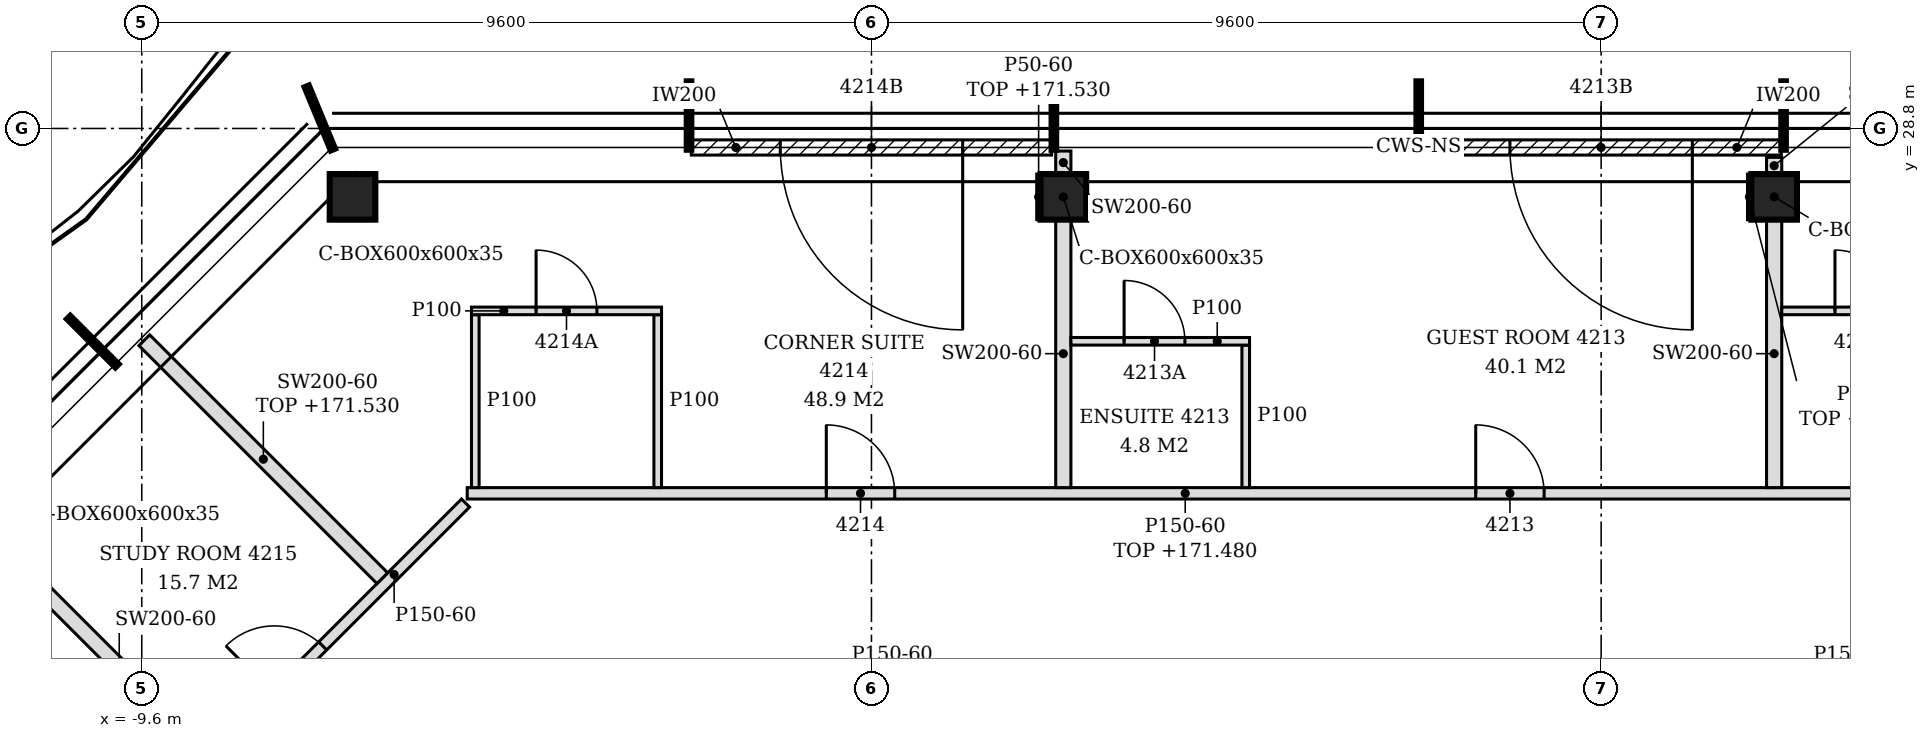
"""IFC4 building model, lengths in metres.
Left out: names, types, materials, properties, quantities, classifications, styles, units other than length and angle.
Written with IfcOpenShell. Run it as: python <this file> out.ifc"""

import sys

from ifc_helpers import new_model, si_unit, direction, frame, frame_2d, origin, origin_2d, place, context, subcontext, project, spatial, polyline, rectangle, hollow_rectangle, outline, extrude, clip, halfspace, element, fill, save


model = new_model("IFC4")
c1 = context("Model", 3, precision=1e-05, world=origin(), true_north=direction((0.0, 1.0)))
c2 = subcontext(c1, "Body", "Model", "MODEL_VIEW")
j1 = project(units=[si_unit("LENGTHUNIT", "METRE"), si_unit("PLANEANGLEUNIT", "RADIAN")], contexts=[c1])
p1 = place(None, origin())
s1 = spatial("IfcSite", under=j1, at=p1, CompositionType="ELEMENT")
p2 = place(p1, origin())
s2 = spatial("IfcBuilding", under=s1, at=p2, CompositionType="ELEMENT")
p3 = place(p2, frame((0.0, 0.0, 168.6)))
s3 = spatial("IfcBuildingStorey", under=s2, at=p3, CompositionType="ELEMENT", Elevation=168.6)
for number, where, z_axis, x_axis in (
    (1, (11.876, 27.9, -0.15), (0.0, 0.0, 1.0), (1.0, 0.0, 0.0)),
    (2, (2.524, 27.9, -0.15), (0.0, 0.0, 1.0), (1.0, 0.0, 0.0)),
    (3, (-6.827, 27.9, -0.15), (0.0, 0.0, 1.0), (1.0, 0.0, 0.0)),
):
    element("IfcColumn", number, at=place(p3, frame(where, z_axis=z_axis, x_axis=x_axis)), inside=s3, PredefinedType="COLUMN", context=c2, shape_type="Clipping", body=[
        clip(extrude(hollow_rectangle(XDim=0.6, YDim=0.6, WallThickness=0.035, at=origin_2d()), origin(), (0.0, 0.0, 1.0), 3.6), halfspace(frame((0.0, 0.0, 3.589), z_axis=(0.0, 0.0, 1.0), x_axis=(1.0, 0.0, 0.0)), False)),
    ])
p4 = place(p3, frame((11.97, 28.55, 0.0), z_axis=(0.0, 0.0, 1.0), x_axis=(-1.0, 0.0, 0.0)))
e4 = element("IfcWall", 4, at=p4, inside=s3, PredefinedType="NOTDEFINED", context=c2, shape_type="SweptSolid", body=[
    extrude(rectangle(XDim=4.74, YDim=0.2, at=frame_2d((2.37, 0.0))), origin(), (0.0, 0.0, 1.0), 3.45),
])
p5 = place(p4, frame((1.17, 0.0, 0.0)))
e5 = element("IfcOpeningElement", 5, at=p5, cuts=e4, PredefinedType="OPENING", context=c2, shape_type="SweptSolid", body=[
    extrude(rectangle(XDim=2.4, YDim=2.4, at=frame_2d((1.2, 1.2))), frame((0.0, 0.11, 0.0), z_axis=(0.0, -1.0, 0.0), x_axis=(1.0, 0.0, 0.0)), (0.0, 0.0, 1.0), 0.22),
])
p6 = place(p3, frame((2.37, 28.55, 0.0), z_axis=(0.0, 0.0, 1.0), x_axis=(-1.0, 0.0, 0.0)))
e6 = element("IfcWall", 6, at=p6, inside=s3, PredefinedType="NOTDEFINED", context=c2, shape_type="SweptSolid", body=[
    extrude(rectangle(XDim=4.74, YDim=0.2, at=frame_2d((2.37, 0.0))), origin(), (0.0, 0.0, 1.0), 3.45),
])
p7 = place(p6, frame((1.17, 0.0, 0.0)))
e7 = element("IfcOpeningElement", 7, at=p7, cuts=e6, PredefinedType="OPENING", context=c2, shape_type="SweptSolid", body=[
    extrude(rectangle(XDim=2.4, YDim=2.4, at=frame_2d((1.2, 1.2))), frame((0.0, 0.11, 0.0), z_axis=(0.0, -1.0, 0.0), x_axis=(1.0, 0.0, 0.0)), (0.0, 0.0, 1.0), 0.22),
])
p8 = place(p3, frame((-8.641, 20.465, 0.0), z_axis=(0.0, 0.0, 1.0), x_axis=(-0.707106781187, 0.707106781187, 0.0)))
e8 = element("IfcWall", 8, at=p8, inside=s3, PredefinedType="PARTITIONING", context=c2, shape_type="SweptSolid", body=[
    extrude(rectangle(XDim=3.55, YDim=0.2, at=frame_2d((1.775, 0.0))), origin(), (0.0, 0.0, 1.0), 3.45),
])
p9 = place(p3, frame((-8.623, 20.589, 0.0), z_axis=(0.0, 0.0, 1.0), x_axis=(0.707106781187, 0.707106781187, 0.0)))
e9 = element("IfcWall", 9, at=p9, inside=s3, PredefinedType="PARTITIONING", context=c2, shape_type="SweptSolid", body=[
    extrude(rectangle(XDim=4.643, YDim=0.15, at=frame_2d((2.322, 0.0))), origin(), (0.0, 0.0, 1.0), 3.45),
])
p10 = place(p9, frame((1.085, 0.0, 0.0)))
e10 = element("IfcOpeningElement", 10, at=p10, cuts=e9, PredefinedType="OPENING", context=c2, shape_type="SweptSolid", body=[
    extrude(rectangle(XDim=0.9, YDim=2.1, at=frame_2d((0.45, 1.05))), frame((0.0, 0.085, 0.0), z_axis=(0.0, -1.0, 0.0), x_axis=(1.0, 0.0, 0.0)), (0.0, 0.0, 1.0), 0.17),
])
p11 = place(p3, frame((-6.435, 22.883, 0.0), z_axis=(0.0, 0.0, 1.0), x_axis=(-0.707106781187, 0.707106781187, 0.0)))
e11 = element("IfcWall", 11, at=p11, inside=s3, PredefinedType="PARTITIONING", context=c2, shape_type="SweptSolid", body=[
    extrude(rectangle(XDim=4.428, YDim=0.2, at=frame_2d((2.214, 0.0))), origin(), (0.0, 0.0, 1.0), 2.93),
])
p12 = place(p3, frame((-5.318, 24.0, 0.0), z_axis=(0.0, 0.0, 1.0), x_axis=(1.0, 0.0, 0.0)))
e12 = element("IfcWall", 12, at=p12, inside=s3, PredefinedType="PARTITIONING", context=c2, shape_type="SweptSolid", body=[
    extrude(outline(polyline([(0.0, 0.0), (25.036, 0.0), (25.036, 2.88), (24.668, 2.88), (24.666, 2.73), (24.368, 2.73), (24.366, 2.88), (12.668, 2.88), (12.666, 2.73), (12.368, 2.73), (12.366, 2.88), (0.668, 2.88), (0.666, 2.73), (0.368, 2.73), (0.366, 2.88), (0.0, 2.88), (0.0, 0.0)])), frame((0.0, 0.075, 0.0), z_axis=(0.0, -1.0, 0.0), x_axis=(1.0, 0.0, 0.0)), (0.0, 0.0, 1.0), 0.15),
])
p13 = place(p12, frame((21.812, 0.0, 0.0)))
e13 = element("IfcOpeningElement", 13, at=p13, cuts=e12, PredefinedType="OPENING", context=c2, shape_type="SweptSolid", body=[
    extrude(rectangle(XDim=0.9, YDim=2.1, at=frame_2d((0.45, 1.05))), frame((0.0, 0.085, 0.0), z_axis=(0.0, -1.0, 0.0), x_axis=(1.0, 0.0, 0.0)), (0.0, 0.0, 1.0), 0.17),
])
p14 = place(p12, frame((13.268, 0.0, 0.0)))
e14 = element("IfcOpeningElement", 14, at=p14, cuts=e12, PredefinedType="OPENING", context=c2, shape_type="SweptSolid", body=[
    extrude(rectangle(XDim=0.9, YDim=2.1, at=frame_2d((0.45, 1.05))), frame((0.0, 0.085, 0.0), z_axis=(0.0, -1.0, 0.0), x_axis=(1.0, 0.0, 0.0)), (0.0, 0.0, 1.0), 0.17),
])
p15 = place(p12, frame((4.724, 0.0, 0.0)))
e15 = element("IfcOpeningElement", 15, at=p15, cuts=e12, PredefinedType="OPENING", context=c2, shape_type="SweptSolid", body=[
    extrude(rectangle(XDim=0.9, YDim=2.1, at=frame_2d((0.45, 1.05))), frame((0.0, 0.085, 0.0), z_axis=(0.0, -1.0, 0.0), x_axis=(1.0, 0.0, 0.0)), (0.0, 0.0, 1.0), 0.17),
])
p16 = place(p3, frame((-5.212, 24.075, 0.0), z_axis=(0.0, 0.0, 1.0), x_axis=(0.0, 1.0, 0.0)))
e16 = element("IfcWall", 16, at=p16, inside=s3, PredefinedType="PARTITIONING", context=c2, shape_type="SweptSolid", body=[
    extrude(outline(polyline([(0.0, 0.0), (2.275, 0.0), (2.275, 3.45), (0.01, 3.45), (0.008, 3.07), (0.0, 3.07), (0.0, 0.0)])), frame((0.0, 0.05, 0.0), z_axis=(0.0, -1.0, 0.0), x_axis=(1.0, 0.0, 0.0)), (0.0, 0.0, 1.0), 0.1),
])
p17 = place(p3, frame((-2.812, 24.075, 0.0), z_axis=(0.0, 0.0, 1.0), x_axis=(0.0, 1.0, 0.0)))
e17 = element("IfcWall", 17, at=p17, inside=s3, PredefinedType="PARTITIONING", context=c2, shape_type="SweptSolid", body=[
    extrude(outline(polyline([(0.0, 0.0), (2.275, 0.0), (2.275, 3.45), (0.03, 3.45), (0.028, 2.88), (0.0, 2.88), (0.0, 0.0)])), frame((0.0, 0.05, 0.0), z_axis=(0.0, -1.0, 0.0), x_axis=(1.0, 0.0, 0.0)), (0.0, 0.0, 1.0), 0.1),
])
p18 = place(p3, frame((2.524, 24.075, 0.0), z_axis=(0.0, 0.0, 1.0), x_axis=(0.0, 1.0, 0.0)))
e18 = element("IfcWall", 18, at=p18, inside=s3, PredefinedType="PARTITIONING", context=c2, shape_type="SweptSolid", body=[
    extrude(outline(polyline([(0.0, 0.0), (3.525, 0.0), (3.525, 3.45), (0.03, 3.45), (0.028, 2.88), (0.0, 2.88), (0.0, 0.0)])), frame((0.0, 0.1, 0.0), z_axis=(0.0, -1.0, 0.0), x_axis=(1.0, 0.0, 0.0)), (0.0, 0.0, 1.0), 0.2),
])
p19 = place(p3, frame((4.924, 24.075, 0.0), z_axis=(0.0, 0.0, 1.0), x_axis=(0.0, 1.0, 0.0)))
e19 = element("IfcWall", 19, at=p19, inside=s3, PredefinedType="PARTITIONING", context=c2, shape_type="SweptSolid", body=[
    extrude(outline(polyline([(0.0, 0.0), (1.875, 0.0), (1.875, 3.45), (0.03, 3.45), (0.028, 2.88), (0.0, 2.88), (0.0, 0.0)])), frame((0.0, 0.05, 0.0), z_axis=(0.0, -1.0, 0.0), x_axis=(1.0, 0.0, 0.0)), (0.0, 0.0, 1.0), 0.1),
])
p20 = place(p3, frame((11.876, 24.075, 0.0), z_axis=(0.0, 0.0, 1.0), x_axis=(0.0, 1.0, 0.0)))
e20 = element("IfcWall", 20, at=p20, inside=s3, PredefinedType="PARTITIONING", context=c2, shape_type="SweptSolid", body=[
    extrude(outline(polyline([(0.0, 0.0), (3.525, 0.0), (3.525, 3.45), (0.03, 3.45), (0.028, 2.88), (0.0, 2.88), (0.0, 0.0)])), frame((0.0, 0.1, 0.0), z_axis=(0.0, -1.0, 0.0), x_axis=(1.0, 0.0, 0.0)), (0.0, 0.0, 1.0), 0.2),
])
p21 = place(p3, frame((2.624, 26.0, 0.0), z_axis=(0.0, 0.0, 1.0), x_axis=(1.0, 0.0, 0.0)))
e21 = element("IfcWall", 21, at=p21, inside=s3, PredefinedType="PARTITIONING", context=c2, shape_type="SweptSolid", body=[
    extrude(rectangle(XDim=2.35, YDim=0.1, at=frame_2d((1.175, 0.0))), origin(), (0.0, 0.0, 1.0), 3.45),
])
p22 = place(p21, frame((0.7, 0.0, 0.0)))
e22 = element("IfcOpeningElement", 22, at=p22, cuts=e21, PredefinedType="OPENING", context=c2, shape_type="SweptSolid", body=[
    extrude(rectangle(XDim=0.8, YDim=2.1, at=frame_2d((0.4, 1.05))), frame((0.0, 0.06, 0.0), z_axis=(0.0, -1.0, 0.0), x_axis=(1.0, 0.0, 0.0)), (0.0, 0.0, 1.0), 0.12),
])
p23 = place(p3, frame((-5.262, 26.4, 0.0), z_axis=(0.0, 0.0, 1.0), x_axis=(1.0, 0.0, 0.0)))
e23 = element("IfcWall", 23, at=p23, inside=s3, PredefinedType="PARTITIONING", context=c2, shape_type="SweptSolid", body=[
    extrude(outline(polyline([(0.0, 0.0), (2.5, 0.0), (2.5, 3.45), (0.612, 3.45), (0.61, 2.73), (0.312, 2.73), (0.31, 3.45), (0.0, 3.45), (0.0, 0.0)])), frame((0.0, 0.05, 0.0), z_axis=(0.0, -1.0, 0.0), x_axis=(1.0, 0.0, 0.0)), (0.0, 0.0, 1.0), 0.1),
])
p24 = place(p23, frame((0.85, 0.0, 0.0)))
e24 = element("IfcOpeningElement", 24, at=p24, cuts=e23, PredefinedType="OPENING", context=c2, shape_type="SweptSolid", body=[
    extrude(rectangle(XDim=0.8, YDim=2.1, at=frame_2d((0.4, 1.05))), frame((0.0, 0.06, 0.0), z_axis=(0.0, -1.0, 0.0), x_axis=(1.0, 0.0, 0.0)), (0.0, 0.0, 1.0), 0.12),
])
p25 = place(p3, frame((11.976, 26.4, 0.0), z_axis=(0.0, 0.0, 1.0), x_axis=(1.0, 0.0, 0.0)))
e25 = element("IfcWall", 25, at=p25, inside=s3, PredefinedType="PARTITIONING", context=c2, shape_type="SweptSolid", body=[
    extrude(rectangle(XDim=2.35, YDim=0.1, at=frame_2d((1.175, 0.0))), origin(), (0.0, 0.0, 1.0), 3.45),
])
p26 = place(p25, frame((0.7, 0.0, 0.0)))
e26 = element("IfcOpeningElement", 26, at=p26, cuts=e25, PredefinedType="OPENING", context=c2, shape_type="SweptSolid", body=[
    extrude(rectangle(XDim=0.8, YDim=2.1, at=frame_2d((0.4, 1.05))), frame((0.0, 0.06, 0.0), z_axis=(0.0, -1.0, 0.0), x_axis=(1.0, 0.0, 0.0)), (0.0, 0.0, 1.0), 0.12),
])
p27 = place(p3, frame((2.524, 28.2, 0.0), z_axis=(0.0, 0.0, 1.0), x_axis=(0.0, 1.0, 0.0)))
e27 = element("IfcWall", 27, at=p27, inside=s3, PredefinedType="PARTITIONING", context=c2, shape_type="SweptSolid", body=[
    extrude(rectangle(XDim=0.303, YDim=0.2, at=frame_2d((0.151, 0.0))), origin(), (0.0, 0.0, 1.0), 3.45),
])
p28 = place(p3, frame((11.876, 28.2, 0.0), z_axis=(0.0, 0.0, 1.0), x_axis=(0.0, 1.0, 0.0)))
e28 = element("IfcWall", 28, at=p28, inside=s3, PredefinedType="PARTITIONING", context=c2, shape_type="SweptSolid", body=[
    extrude(rectangle(XDim=0.22, YDim=0.2, at=frame_2d((0.11, 0.0))), origin(), (0.0, 0.0, 1.0), 3.45),
])
for number, where, z_axis, x_axis in (
    (29, (2.199, 27.6, 0.0), (0.0, 0.0, 1.0), (0.0, 1.0, 0.0)),
    (30, (11.551, 27.6, 0.0), (0.0, 0.0, 1.0), (0.0, 1.0, 0.0)),
):
    element("IfcWall", number, at=place(p3, frame(where, z_axis=z_axis, x_axis=x_axis)), inside=s3, PredefinedType="PARTITIONING", context=c2, shape_type="SweptSolid", body=[
        extrude(rectangle(XDim=0.6, YDim=0.05, at=frame_2d((0.3, 0.0))), origin(), (0.0, 0.0, 1.0), 2.93),
    ])
p29 = place(p5, origin())
e31 = element("IfcDoor", 31, at=p29, inside=s3, OperationType="SINGLE_SWING_LEFT", PredefinedType="DOOR", context=c2, shape_type="SweptSolid", body=[
    extrude(rectangle(XDim=2.4, YDim=2.4, at=frame_2d((1.2, 1.2))), frame((0.0, 0.025, 0.0), z_axis=(0.0, -1.0, 0.0), x_axis=(1.0, 0.0, 0.0)), (0.0, 0.0, 1.0), 0.05),
])
fill(e5, e31)
p30 = place(p7, origin())
e32 = element("IfcDoor", 32, at=p30, inside=s3, OperationType="SINGLE_SWING_LEFT", PredefinedType="DOOR", context=c2, shape_type="SweptSolid", body=[
    extrude(rectangle(XDim=2.4, YDim=2.4, at=frame_2d((1.2, 1.2))), frame((0.0, 0.025, 0.0), z_axis=(0.0, -1.0, 0.0), x_axis=(1.0, 0.0, 0.0)), (0.0, 0.0, 1.0), 0.05),
])
fill(e7, e32)
p31 = place(p26, origin())
e33 = element("IfcDoor", 33, at=p31, inside=s3, OperationType="SINGLE_SWING_LEFT", PredefinedType="DOOR", context=c2, shape_type="SweptSolid", body=[
    extrude(rectangle(XDim=0.8, YDim=2.1, at=frame_2d((0.4, 1.05))), frame((0.0, 0.025, 0.0), z_axis=(0.0, -1.0, 0.0), x_axis=(1.0, 0.0, 0.0)), (0.0, 0.0, 1.0), 0.05),
])
fill(e26, e33)
p32 = place(p14, origin())
e34 = element("IfcDoor", 34, at=p32, inside=s3, OperationType="SINGLE_SWING_LEFT", PredefinedType="DOOR", context=c2, shape_type="SweptSolid", body=[
    extrude(rectangle(XDim=0.9, YDim=2.1, at=frame_2d((0.45, 1.05))), frame((0.0, 0.025, 0.0), z_axis=(0.0, -1.0, 0.0), x_axis=(1.0, 0.0, 0.0)), (0.0, 0.0, 1.0), 0.05),
])
fill(e14, e34)
p33 = place(p22, origin())
e35 = element("IfcDoor", 35, at=p33, inside=s3, OperationType="SINGLE_SWING_LEFT", PredefinedType="DOOR", context=c2, shape_type="SweptSolid", body=[
    extrude(rectangle(XDim=0.8, YDim=2.1, at=frame_2d((0.4, 1.05))), frame((0.0, 0.025, 0.0), z_axis=(0.0, -1.0, 0.0), x_axis=(1.0, 0.0, 0.0)), (0.0, 0.0, 1.0), 0.05),
])
fill(e22, e35)
p34 = place(p15, origin())
e36 = element("IfcDoor", 36, at=p34, inside=s3, OperationType="SINGLE_SWING_LEFT", PredefinedType="DOOR", context=c2, shape_type="SweptSolid", body=[
    extrude(rectangle(XDim=0.9, YDim=2.1, at=frame_2d((0.45, 1.05))), frame((0.0, 0.025, 0.0), z_axis=(0.0, -1.0, 0.0), x_axis=(1.0, 0.0, 0.0)), (0.0, 0.0, 1.0), 0.05),
])
fill(e15, e36)
p35 = place(p24, origin())
e37 = element("IfcDoor", 37, at=p35, inside=s3, OperationType="SINGLE_SWING_LEFT", PredefinedType="DOOR", context=c2, shape_type="SweptSolid", body=[
    extrude(rectangle(XDim=0.8, YDim=2.1, at=frame_2d((0.4, 1.05))), frame((0.0, 0.025, 0.0), z_axis=(0.0, -1.0, 0.0), x_axis=(1.0, 0.0, 0.0)), (0.0, 0.0, 1.0), 0.05),
])
fill(e24, e37)
p36 = place(p10, origin())
e38 = element("IfcDoor", 38, at=p36, inside=s3, OperationType="SINGLE_SWING_LEFT", PredefinedType="DOOR", context=c2, shape_type="SweptSolid", body=[
    extrude(rectangle(XDim=0.9, YDim=2.1, at=frame_2d((0.45, 1.05))), frame((0.0, 0.025, 0.0), z_axis=(0.0, -1.0, 0.0), x_axis=(1.0, 0.0, 0.0)), (0.0, 0.0, 1.0), 0.05),
])
fill(e10, e38)
save(model, sys.argv[1])
